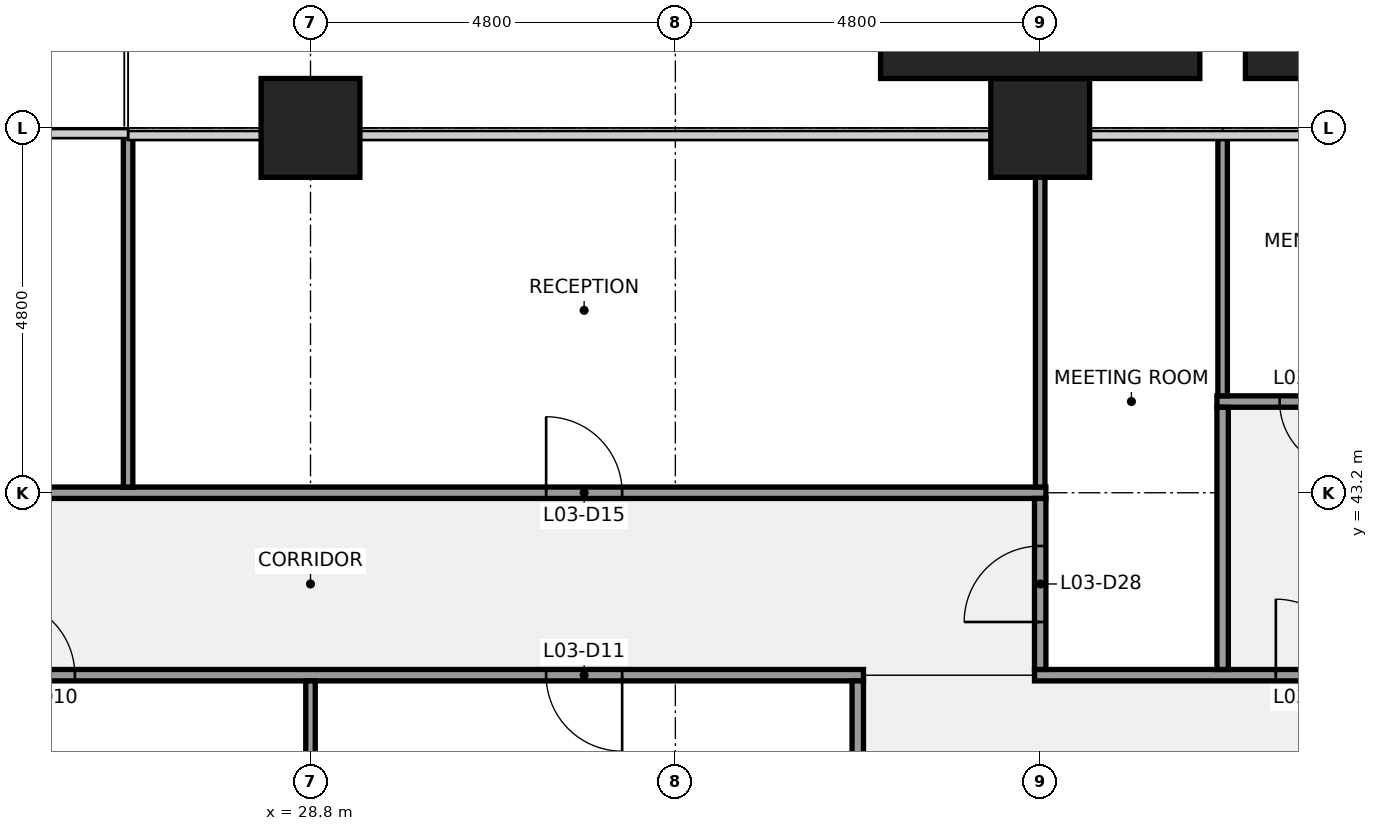
"""IFC4 building model, lengths in metres.
Left out: names, types, materials, properties, quantities, classifications, styles, units other than length and angle.
Written with IfcOpenShell. Run it as: python <this file> out.ifc"""

import sys

from ifc_helpers import new_model, si_unit, direction, frame, frame_2d, origin, origin_2d, place, context, subcontext, project, spatial, rectangle, extrude, element, fill, save


model = new_model("IFC4")
c1 = context("Model", 3, precision=1e-05, world=origin(), true_north=direction((0.0, 1.0)))
c2 = subcontext(c1, "Body", "Model", "MODEL_VIEW")
j1 = project(units=[si_unit("LENGTHUNIT", "METRE"), si_unit("PLANEANGLEUNIT", "RADIAN")], contexts=[c1])
p1 = place(None, origin())
s1 = spatial("IfcSite", under=j1, at=p1, CompositionType="ELEMENT")
p2 = place(p1, origin())
s2 = spatial("IfcBuilding", under=s1, at=p2, CompositionType="ELEMENT")
p3 = place(p2, frame((0.0, 0.0, 21.4)))
s3 = spatial("IfcBuildingStorey", under=s2, at=p3, CompositionType="ELEMENT", Elevation=21.4)
for number, where, z_axis, x_axis in (
    (1, (28.8, 48.0, 0.0), (0.0, 0.0, 1.0), (1.0, 0.0, 0.0)),
    (2, (38.4, 48.0, 0.0), (0.0, 0.0, 1.0), (1.0, 0.0, 0.0)),
):
    element("IfcColumn", number, at=place(p3, frame(where, z_axis=z_axis, x_axis=x_axis)), inside=s3, PredefinedType="COLUMN", context=c2, shape_type="SweptSolid", body=[
        extrude(rectangle(XDim=1.3, YDim=1.3, at=origin_2d()), origin(), (0.0, 0.0, 1.0), 4.4),
    ])
p4 = place(p3, frame((21.525, 40.8, 0.0), z_axis=(0.0, 0.0, 1.0), x_axis=(1.0, 0.0, 0.0)))
e3 = element("IfcWall", 3, at=p4, inside=s3, PredefinedType="PARTITIONING", context=c2, shape_type="SweptSolid", body=[
    extrude(rectangle(XDim=14.55, YDim=0.15, at=frame_2d((7.275, 0.0))), origin(), (0.0, 0.0, 1.0), 3.27),
])
p5 = place(p4, frame((3.175, 0.0, 0.0)))
e4 = element("IfcOpeningElement", 4, at=p5, cuts=e3, PredefinedType="OPENING", context=c2, shape_type="SweptSolid", body=[
    extrude(rectangle(XDim=1.0, YDim=2.1, at=frame_2d((0.5, 1.05))), frame((0.0, 0.085, 0.0), z_axis=(0.0, -1.0, 0.0), x_axis=(1.0, 0.0, 0.0)), (0.0, 0.0, 1.0), 0.17),
])
p6 = place(p4, frame((10.375, 0.0, 0.0)))
e5 = element("IfcOpeningElement", 5, at=p6, cuts=e3, PredefinedType="OPENING", context=c2, shape_type="SweptSolid", body=[
    extrude(rectangle(XDim=1.0, YDim=2.1, at=frame_2d((0.5, 1.05))), frame((0.0, 0.085, 0.0), z_axis=(0.0, -1.0, 0.0), x_axis=(1.0, 0.0, 0.0)), (0.0, 0.0, 1.0), 0.17),
])
p7 = place(p3, frame((38.325, 40.8, 0.0), z_axis=(0.0, 0.0, 1.0), x_axis=(1.0, 0.0, 0.0)))
e6 = element("IfcWall", 6, at=p7, inside=s3, PredefinedType="PARTITIONING", context=c2, shape_type="SweptSolid", body=[
    extrude(rectangle(XDim=9.75, YDim=0.15, at=frame_2d((4.875, 0.0))), origin(), (0.0, 0.0, 1.0), 3.27),
])
p8 = place(p7, frame((3.175, 0.0, 0.0)))
e7 = element("IfcOpeningElement", 7, at=p8, cuts=e6, PredefinedType="OPENING", context=c2, shape_type="SweptSolid", body=[
    extrude(rectangle(XDim=1.0, YDim=2.1, at=frame_2d((0.5, 1.05))), frame((0.0, 0.085, 0.0), z_axis=(0.0, -1.0, 0.0), x_axis=(1.0, 0.0, 0.0)), (0.0, 0.0, 1.0), 0.17),
])
p9 = place(p3, frame((19.125, 43.2, 0.0), z_axis=(0.0, 0.0, 1.0), x_axis=(1.0, 0.0, 0.0)))
e8 = element("IfcWall", 8, at=p9, inside=s3, PredefinedType="PARTITIONING", context=c2, shape_type="SweptSolid", body=[
    extrude(rectangle(XDim=19.35, YDim=0.15, at=frame_2d((9.675, 0.0))), origin(), (0.0, 0.0, 1.0), 3.27),
])
p10 = place(p9, frame((0.775, 0.0, 0.0)))
e9 = element("IfcOpeningElement", 9, at=p10, cuts=e8, PredefinedType="OPENING", context=c2, shape_type="SweptSolid", body=[
    extrude(rectangle(XDim=1.0, YDim=2.1, at=frame_2d((0.5, 1.05))), frame((0.0, 0.085, 0.0), z_axis=(0.0, -1.0, 0.0), x_axis=(1.0, 0.0, 0.0)), (0.0, 0.0, 1.0), 0.17),
])
p11 = place(p9, frame((4.375, 0.0, 0.0)))
e10 = element("IfcOpeningElement", 10, at=p11, cuts=e8, PredefinedType="OPENING", context=c2, shape_type="SweptSolid", body=[
    extrude(rectangle(XDim=1.0, YDim=2.1, at=frame_2d((0.5, 1.05))), frame((0.0, 0.085, 0.0), z_axis=(0.0, -1.0, 0.0), x_axis=(1.0, 0.0, 0.0)), (0.0, 0.0, 1.0), 0.17),
])
p12 = place(p9, frame((12.775, 0.0, 0.0)))
e11 = element("IfcOpeningElement", 11, at=p12, cuts=e8, PredefinedType="OPENING", context=c2, shape_type="SweptSolid", body=[
    extrude(rectangle(XDim=1.0, YDim=2.1, at=frame_2d((0.5, 1.05))), frame((0.0, 0.085, 0.0), z_axis=(0.0, -1.0, 0.0), x_axis=(1.0, 0.0, 0.0)), (0.0, 0.0, 1.0), 0.17),
])
p13 = place(p3, frame((40.725, 44.4, 0.0), z_axis=(0.0, 0.0, 1.0), x_axis=(1.0, 0.0, 0.0)))
e12 = element("IfcWall", 12, at=p13, inside=s3, PredefinedType="PARTITIONING", context=c2, shape_type="SweptSolid", body=[
    extrude(rectangle(XDim=7.175, YDim=0.15, at=frame_2d((3.587, 0.0))), origin(), (0.0, 0.0, 1.0), 3.27),
])
p14 = place(p13, frame((0.825, 0.0, 0.0)))
e13 = element("IfcOpeningElement", 13, at=p14, cuts=e12, PredefinedType="OPENING", context=c2, shape_type="SweptSolid", body=[
    extrude(rectangle(XDim=0.9, YDim=2.1, at=frame_2d((0.45, 1.05))), frame((0.0, 0.085, 0.0), z_axis=(0.0, -1.0, 0.0), x_axis=(1.0, 0.0, 0.0)), (0.0, 0.0, 1.0), 0.17),
])
p15 = place(p13, frame((3.225, 0.0, 0.0)))
e14 = element("IfcOpeningElement", 14, at=p15, cuts=e12, PredefinedType="OPENING", context=c2, shape_type="SweptSolid", body=[
    extrude(rectangle(XDim=0.9, YDim=2.1, at=frame_2d((0.45, 1.05))), frame((0.0, 0.085, 0.0), z_axis=(0.0, -1.0, 0.0), x_axis=(1.0, 0.0, 0.0)), (0.0, 0.0, 1.0), 0.17),
])
p16 = place(p13, frame((5.425, 0.0, 0.0)))
e15 = element("IfcOpeningElement", 15, at=p16, cuts=e12, PredefinedType="OPENING", context=c2, shape_type="SweptSolid", body=[
    extrude(rectangle(XDim=1.2, YDim=2.1, at=frame_2d((0.6, 1.05))), frame((0.0, 0.085, 0.0), z_axis=(0.0, -1.0, 0.0), x_axis=(1.0, 0.0, 0.0)), (0.0, 0.0, 1.0), 0.17),
])
p17 = place(p3, frame((26.4, 43.275, 0.0), z_axis=(0.0, 0.0, 1.0), x_axis=(0.0, 1.0, 0.0)))
e16 = element("IfcWall", 16, at=p17, inside=s3, PredefinedType="PARTITIONING", context=c2, shape_type="SweptSolid", body=[
    extrude(rectangle(XDim=4.625, YDim=0.125, at=frame_2d((2.312, 0.0))), origin(), (0.0, 0.0, 1.0), 3.27),
])
p18 = place(p3, frame((28.8, 33.663, 0.0), z_axis=(0.0, 0.0, 1.0), x_axis=(0.0, 1.0, 0.0)))
e17 = element("IfcWall", 17, at=p18, inside=s3, PredefinedType="PARTITIONING", context=c2, shape_type="SweptSolid", body=[
    extrude(rectangle(XDim=7.062, YDim=0.125, at=frame_2d((3.531, 0.0))), origin(), (0.0, 0.0, 1.0), 3.27),
])
p19 = place(p3, frame((36.0, 33.663, 0.0), z_axis=(0.0, 0.0, 1.0), x_axis=(0.0, 1.0, 0.0)))
e18 = element("IfcWall", 18, at=p19, inside=s3, PredefinedType="PARTITIONING", context=c2, shape_type="SweptSolid", body=[
    extrude(rectangle(XDim=7.062, YDim=0.15, at=frame_2d((3.531, 0.0))), origin(), (0.0, 0.0, 1.0), 3.27),
])
p20 = place(p3, frame((38.4, 43.275, 0.0), z_axis=(0.0, 0.0, 1.0), x_axis=(0.0, 1.0, 0.0)))
e19 = element("IfcWall", 19, at=p20, inside=s3, PredefinedType="PARTITIONING", context=c2, shape_type="SweptSolid", body=[
    extrude(rectangle(XDim=4.075, YDim=0.125, at=frame_2d((2.038, 0.0))), origin(), (0.0, 0.0, 1.0), 3.27),
])
p21 = place(p3, frame((38.4, 40.875, 0.0), z_axis=(0.0, 0.0, 1.0), x_axis=(0.0, 1.0, 0.0)))
e20 = element("IfcWall", 20, at=p21, inside=s3, PredefinedType="PARTITIONING", context=c2, shape_type="SweptSolid", body=[
    extrude(rectangle(XDim=2.25, YDim=0.15, at=frame_2d((1.125, 0.0))), origin(), (0.0, 0.0, 1.0), 3.27),
])
p22 = place(p21, frame((0.625, 0.0, 0.0)))
e21 = element("IfcOpeningElement", 21, at=p22, cuts=e20, PredefinedType="OPENING", context=c2, shape_type="SweptSolid", body=[
    extrude(rectangle(XDim=1.0, YDim=2.1, at=frame_2d((0.5, 1.05))), frame((0.0, 0.085, 0.0), z_axis=(0.0, -1.0, 0.0), x_axis=(1.0, 0.0, 0.0)), (0.0, 0.0, 1.0), 0.17),
])
p23 = place(p3, frame((40.8, 44.475, 0.0), z_axis=(0.0, 0.0, 1.0), x_axis=(0.0, 1.0, 0.0)))
e22 = element("IfcWall", 22, at=p23, inside=s3, PredefinedType="PARTITIONING", context=c2, shape_type="SweptSolid", body=[
    extrude(rectangle(XDim=3.425, YDim=0.125, at=frame_2d((1.712, 0.0))), origin(), (0.0, 0.0, 1.0), 3.27),
])
p24 = place(p3, frame((40.8, 40.875, 0.0), z_axis=(0.0, 0.0, 1.0), x_axis=(0.0, 1.0, 0.0)))
e23 = element("IfcWall", 23, at=p24, inside=s3, PredefinedType="PARTITIONING", context=c2, shape_type="SweptSolid", body=[
    extrude(rectangle(XDim=3.45, YDim=0.15, at=frame_2d((1.725, 0.0))), origin(), (0.0, 0.0, 1.0), 3.27),
])
for number, where, z_axis, x_axis in (
    (24, (38.4, 49.075, 0.0), (0.0, 0.0, 1.0), (1.0, 0.0, 0.0)),
    (25, (43.2, 49.075, 0.0), (0.0, 0.0, 1.0), (1.0, 0.0, 0.0)),
):
    element("IfcColumn", number, at=place(p3, frame(where, z_axis=z_axis, x_axis=x_axis)), inside=s3, PredefinedType="PILASTER", context=c2, shape_type="SweptSolid", body=[
        extrude(rectangle(XDim=4.2, YDim=0.85, at=origin_2d()), origin(), (0.0, 0.0, 1.0), 4.4),
    ])
p25 = place(p5, origin())
e26 = element("IfcDoor", 26, at=p25, inside=s3, OperationType="SINGLE_SWING_LEFT", PredefinedType="DOOR", context=c2, shape_type="SweptSolid", body=[
    extrude(rectangle(XDim=1.0, YDim=2.1, at=frame_2d((0.5, 1.05))), frame((0.0, 0.025, 0.0), z_axis=(0.0, -1.0, 0.0), x_axis=(1.0, 0.0, 0.0)), (0.0, 0.0, 1.0), 0.05),
])
fill(e4, e26)
p26 = place(p6, origin())
e27 = element("IfcDoor", 27, at=p26, inside=s3, OperationType="SINGLE_SWING_RIGHT", PredefinedType="DOOR", context=c2, shape_type="SweptSolid", body=[
    extrude(rectangle(XDim=1.0, YDim=2.1, at=frame_2d((0.5, 1.05))), frame((0.0, 0.025, 0.0), z_axis=(0.0, -1.0, 0.0), x_axis=(1.0, 0.0, 0.0)), (0.0, 0.0, 1.0), 0.05),
])
fill(e5, e27)
p27 = place(p8, origin())
e28 = element("IfcDoor", 28, at=p27, inside=s3, OperationType="SINGLE_SWING_LEFT", PredefinedType="DOOR", context=c2, shape_type="SweptSolid", body=[
    extrude(rectangle(XDim=1.0, YDim=2.1, at=frame_2d((0.5, 1.05))), frame((0.0, 0.025, 0.0), z_axis=(0.0, -1.0, 0.0), x_axis=(1.0, 0.0, 0.0)), (0.0, 0.0, 1.0), 0.05),
])
fill(e7, e28)
p28 = place(p12, origin())
e29 = element("IfcDoor", 29, at=p28, inside=s3, OperationType="SINGLE_SWING_LEFT", PredefinedType="DOOR", context=c2, shape_type="SweptSolid", body=[
    extrude(rectangle(XDim=1.0, YDim=2.1, at=frame_2d((0.5, 1.05))), frame((0.0, 0.025, 0.0), z_axis=(0.0, -1.0, 0.0), x_axis=(1.0, 0.0, 0.0)), (0.0, 0.0, 1.0), 0.05),
])
fill(e11, e29)
p29 = place(p14, origin())
e30 = element("IfcDoor", 30, at=p29, inside=s3, OperationType="SINGLE_SWING_RIGHT", PredefinedType="DOOR", context=c2, shape_type="SweptSolid", body=[
    extrude(rectangle(XDim=0.9, YDim=2.1, at=frame_2d((0.45, 1.05))), frame((0.0, 0.025, 0.0), z_axis=(0.0, -1.0, 0.0), x_axis=(1.0, 0.0, 0.0)), (0.0, 0.0, 1.0), 0.05),
])
fill(e13, e30)
p30 = place(p22, origin())
e31 = element("IfcDoor", 31, at=p30, inside=s3, OperationType="SINGLE_SWING_LEFT", PredefinedType="DOOR", context=c2, shape_type="SweptSolid", body=[
    extrude(rectangle(XDim=1.0, YDim=2.1, at=frame_2d((0.5, 1.05))), frame((0.0, 0.025, 0.0), z_axis=(0.0, -1.0, 0.0), x_axis=(1.0, 0.0, 0.0)), (0.0, 0.0, 1.0), 0.05),
])
fill(e21, e31)
save(model, sys.argv[1])
